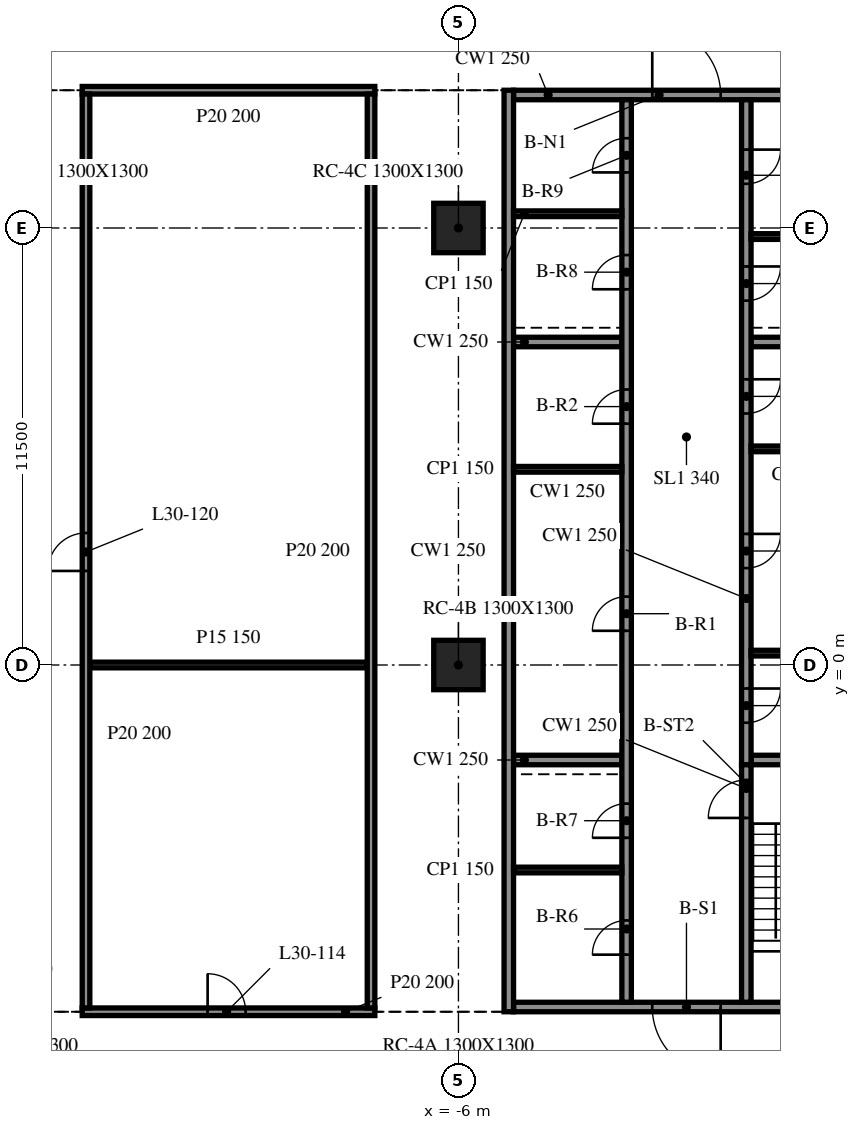
"""IFC4 building model, lengths in metres.
Left out: names, types, materials, properties, quantities, classifications, styles, units other than length and angle.
Written with IfcOpenShell. Run it as: python <this file> out.ifc"""

import sys

from ifc_helpers import new_model, si_unit, direction, frame, frame_2d, origin, origin_2d, place, context, subcontext, project, spatial, rectangle, extrude, element, fill, save


model = new_model("IFC4")
c1 = context("Model", 3, precision=1e-05, world=origin(), true_north=direction((0.0, 1.0)))
c2 = subcontext(c1, "Body", "Model", "MODEL_VIEW")
j1 = project(units=[si_unit("LENGTHUNIT", "METRE"), si_unit("PLANEANGLEUNIT", "RADIAN")], contexts=[c1])
p1 = place(None, origin())
s1 = spatial("IfcSite", under=j1, at=p1, CompositionType="ELEMENT")
p2 = place(p1, origin())
s2 = spatial("IfcBuilding", under=s1, at=p2, CompositionType="ELEMENT")
p3 = place(p2, frame((0.0, 0.0, 130.2)))
s3 = spatial("IfcBuildingStorey", under=s2, at=p3, CompositionType="ELEMENT", Elevation=130.2)
for number, where, z_axis, x_axis in (
    (1, (-6.0, 0.0, -0.34), (0.0, 0.0, 1.0), (1.0, 0.0, 0.0)),
    (2, (-6.0, 11.5, -0.34), (0.0, 0.0, 1.0), (1.0, 0.0, 0.0)),
):
    element("IfcColumn", number, at=place(p3, frame(where, z_axis=z_axis, x_axis=x_axis)), inside=s3, PredefinedType="COLUMN", context=c2, shape_type="SweptSolid", body=[
        extrude(rectangle(XDim=1.3, YDim=1.3, at=origin_2d()), origin(), (0.0, 0.0, 1.0), 4.1),
    ])
p4 = place(p3, frame((-4.675, 15.125, 0.0), z_axis=(0.0, 0.0, 1.0), x_axis=(0.0, -1.0, 0.0)))
e3 = element("IfcWall", 3, at=p4, inside=s3, PredefinedType="SOLIDWALL", context=c2, shape_type="SweptSolid", body=[
    extrude(rectangle(XDim=24.25, YDim=0.25, at=frame_2d((12.125, 0.0))), origin(), (0.0, 0.0, 1.0), 3.76),
])
p5 = place(p3, frame((4.55, -9.0, 0.0), z_axis=(0.0, 0.0, 1.0), x_axis=(-1.0, 0.0, 0.0)))
e4 = element("IfcWall", 4, at=p5, inside=s3, PredefinedType="SOLIDWALL", context=c2, shape_type="SweptSolid", body=[
    extrude(rectangle(XDim=9.1, YDim=0.25, at=frame_2d((4.55, 0.0))), origin(), (0.0, 0.0, 1.0), 3.76),
])
p6 = place(p5, frame((3.65, 0.0, 0.0)))
e5 = element("IfcOpeningElement", 5, at=p6, cuts=e4, PredefinedType="OPENING", context=c2, shape_type="SweptSolid", body=[
    extrude(rectangle(XDim=1.8, YDim=2.1, at=frame_2d((0.9, 1.05))), frame((0.0, 0.135, 0.0), z_axis=(0.0, -1.0, 0.0), x_axis=(1.0, 0.0, 0.0)), (0.0, 0.0, 1.0), 0.27),
])
p7 = place(p3, frame((-4.55, 15.0, 0.0), z_axis=(0.0, 0.0, 1.0), x_axis=(1.0, 0.0, 0.0)))
e6 = element("IfcWall", 6, at=p7, inside=s3, PredefinedType="SOLIDWALL", context=c2, shape_type="SweptSolid", body=[
    extrude(rectangle(XDim=9.1, YDim=0.25, at=frame_2d((4.55, 0.0))), origin(), (0.0, 0.0, 1.0), 3.76),
])
p8 = place(p7, frame((3.65, 0.0, 0.0)))
e7 = element("IfcOpeningElement", 7, at=p8, cuts=e6, PredefinedType="OPENING", context=c2, shape_type="SweptSolid", body=[
    extrude(rectangle(XDim=1.8, YDim=2.1, at=frame_2d((0.9, 1.05))), frame((0.0, 0.135, 0.0), z_axis=(0.0, -1.0, 0.0), x_axis=(1.0, 0.0, 0.0)), (0.0, 0.0, 1.0), 0.27),
])
p9 = place(p3, frame((-1.575, -8.875, 0.0), z_axis=(0.0, 0.0, 1.0), x_axis=(0.0, 1.0, 0.0)))
e8 = element("IfcWall", 8, at=p9, inside=s3, PredefinedType="SOLIDWALL", context=c2, shape_type="SweptSolid", body=[
    extrude(rectangle(XDim=23.75, YDim=0.25, at=frame_2d((11.875, 0.0))), origin(), (0.0, 0.0, 1.0), 3.76),
])
p10 = place(p9, frame((9.775, 0.0, 0.0)))
e9 = element("IfcOpeningElement", 9, at=p10, cuts=e8, PredefinedType="OPENING", context=c2, shape_type="SweptSolid", body=[
    extrude(rectangle(XDim=0.9, YDim=2.1, at=frame_2d((0.45, 1.05))), frame((0.0, 0.135, 0.0), z_axis=(0.0, -1.0, 0.0), x_axis=(1.0, 0.0, 0.0)), (0.0, 0.0, 1.0), 0.27),
])
p11 = place(p9, frame((15.225, 0.0, 0.0)))
e10 = element("IfcOpeningElement", 10, at=p11, cuts=e8, PredefinedType="OPENING", context=c2, shape_type="SweptSolid", body=[
    extrude(rectangle(XDim=0.9, YDim=2.1, at=frame_2d((0.45, 1.05))), frame((0.0, 0.135, 0.0), z_axis=(0.0, -1.0, 0.0), x_axis=(1.0, 0.0, 0.0)), (0.0, 0.0, 1.0), 0.27),
])
p12 = place(p9, frame((1.252, 0.0, 0.0)))
e11 = element("IfcOpeningElement", 11, at=p12, cuts=e8, PredefinedType="OPENING", context=c2, shape_type="SweptSolid", body=[
    extrude(rectangle(XDim=0.9, YDim=2.1, at=frame_2d((0.45, 1.05))), frame((0.0, 0.135, 0.0), z_axis=(0.0, -1.0, 0.0), x_axis=(1.0, 0.0, 0.0)), (0.0, 0.0, 1.0), 0.27),
])
p13 = place(p9, frame((4.327, 0.0, 0.0)))
e12 = element("IfcOpeningElement", 12, at=p13, cuts=e8, PredefinedType="OPENING", context=c2, shape_type="SweptSolid", body=[
    extrude(rectangle(XDim=0.9, YDim=2.1, at=frame_2d((0.45, 1.05))), frame((0.0, 0.135, 0.0), z_axis=(0.0, -1.0, 0.0), x_axis=(1.0, 0.0, 0.0)), (0.0, 0.0, 1.0), 0.27),
])
p14 = place(p9, frame((18.762, 0.0, 0.0)))
e13 = element("IfcOpeningElement", 13, at=p14, cuts=e8, PredefinedType="OPENING", context=c2, shape_type="SweptSolid", body=[
    extrude(rectangle(XDim=0.9, YDim=2.1, at=frame_2d((0.45, 1.05))), frame((0.0, 0.135, 0.0), z_axis=(0.0, -1.0, 0.0), x_axis=(1.0, 0.0, 0.0)), (0.0, 0.0, 1.0), 0.27),
])
p15 = place(p9, frame((21.837, 0.0, 0.0)))
e14 = element("IfcOpeningElement", 14, at=p15, cuts=e8, PredefinedType="OPENING", context=c2, shape_type="SweptSolid", body=[
    extrude(rectangle(XDim=0.9, YDim=2.1, at=frame_2d((0.45, 1.05))), frame((0.0, 0.135, 0.0), z_axis=(0.0, -1.0, 0.0), x_axis=(1.0, 0.0, 0.0)), (0.0, 0.0, 1.0), 0.27),
])
p16 = place(p3, frame((1.575, -8.875, 0.0), z_axis=(0.0, 0.0, 1.0), x_axis=(0.0, 1.0, 0.0)))
e15 = element("IfcWall", 15, at=p16, inside=s3, PredefinedType="SOLIDWALL", context=c2, shape_type="SweptSolid", body=[
    extrude(rectangle(XDim=6.25, YDim=0.25, at=frame_2d((3.125, 0.0))), origin(), (0.0, 0.0, 1.0), 3.76),
])
p17 = place(p16, frame((4.85, 0.0, 0.0)))
e16 = element("IfcOpeningElement", 16, at=p17, cuts=e15, PredefinedType="OPENING", context=c2, shape_type="SweptSolid", body=[
    extrude(rectangle(XDim=1.0, YDim=2.1, at=frame_2d((0.5, 1.05))), frame((0.0, 0.135, 0.0), z_axis=(0.0, -1.0, 0.0), x_axis=(1.0, 0.0, 0.0)), (0.0, 0.0, 1.0), 0.27),
])
p18 = place(p3, frame((1.575, 14.875, 0.0), z_axis=(0.0, 0.0, 1.0), x_axis=(0.0, -1.0, 0.0)))
e17 = element("IfcWall", 17, at=p18, inside=s3, PredefinedType="SOLIDWALL", context=c2, shape_type="SweptSolid", body=[
    extrude(rectangle(XDim=17.5, YDim=0.25, at=frame_2d((8.75, 0.0))), origin(), (0.0, 0.0, 1.0), 3.76),
])
p19 = place(p18, frame((15.494, 0.0, 0.0)))
e18 = element("IfcOpeningElement", 18, at=p19, cuts=e17, PredefinedType="OPENING", context=c2, shape_type="SweptSolid", body=[
    extrude(rectangle(XDim=0.9, YDim=2.1, at=frame_2d((0.45, 1.05))), frame((0.0, 0.135, 0.0), z_axis=(0.0, -1.0, 0.0), x_axis=(1.0, 0.0, 0.0)), (0.0, 0.0, 1.0), 0.27),
])
p20 = place(p18, frame((11.425, 0.0, 0.0)))
e19 = element("IfcOpeningElement", 19, at=p20, cuts=e17, PredefinedType="OPENING", context=c2, shape_type="SweptSolid", body=[
    extrude(rectangle(XDim=0.9, YDim=2.1, at=frame_2d((0.45, 1.05))), frame((0.0, 0.135, 0.0), z_axis=(0.0, -1.0, 0.0), x_axis=(1.0, 0.0, 0.0)), (0.0, 0.0, 1.0), 0.27),
])
p21 = place(p18, frame((7.356, 0.0, 0.0)))
e20 = element("IfcOpeningElement", 20, at=p21, cuts=e17, PredefinedType="OPENING", context=c2, shape_type="SweptSolid", body=[
    extrude(rectangle(XDim=0.9, YDim=2.1, at=frame_2d((0.45, 1.05))), frame((0.0, 0.135, 0.0), z_axis=(0.0, -1.0, 0.0), x_axis=(1.0, 0.0, 0.0)), (0.0, 0.0, 1.0), 0.27),
])
p22 = place(p18, frame((4.387, 0.0, 0.0)))
e21 = element("IfcOpeningElement", 21, at=p22, cuts=e17, PredefinedType="OPENING", context=c2, shape_type="SweptSolid", body=[
    extrude(rectangle(XDim=0.9, YDim=2.1, at=frame_2d((0.45, 1.05))), frame((0.0, 0.135, 0.0), z_axis=(0.0, -1.0, 0.0), x_axis=(1.0, 0.0, 0.0)), (0.0, 0.0, 1.0), 0.27),
])
p23 = place(p18, frame((1.312, 0.0, 0.0)))
e22 = element("IfcOpeningElement", 22, at=p23, cuts=e17, PredefinedType="OPENING", context=c2, shape_type="SweptSolid", body=[
    extrude(rectangle(XDim=0.9, YDim=2.1, at=frame_2d((0.45, 1.05))), frame((0.0, 0.135, 0.0), z_axis=(0.0, -1.0, 0.0), x_axis=(1.0, 0.0, 0.0)), (0.0, 0.0, 1.0), 0.27),
])
for number, where, z_axis, x_axis in (
    (23, (-4.55, -2.5, 0.0), (0.0, 0.0, 1.0), (1.0, 0.0, 0.0)),
    (24, (-4.55, 8.5, 0.0), (0.0, 0.0, 1.0), (1.0, 0.0, 0.0)),
    (25, (1.7, -2.5, 0.0), (0.0, 0.0, 1.0), (1.0, 0.0, 0.0)),
    (26, (1.7, 8.5, 0.0), (0.0, 0.0, 1.0), (1.0, 0.0, 0.0)),
):
    element("IfcWall", number, at=place(p3, frame(where, z_axis=z_axis, x_axis=x_axis)), inside=s3, PredefinedType="SOLIDWALL", context=c2, shape_type="SweptSolid", body=[
        extrude(rectangle(XDim=2.85, YDim=0.25, at=frame_2d((1.425, 0.0))), origin(), (0.0, 0.0, 1.0), 3.76),
    ])
for number, where, z_axis, x_axis in (
    (27, (-4.55, 5.15, 0.0), (0.0, 0.0, 1.0), (1.0, 0.0, 0.0)),
    (28, (1.7, 0.312, 0.0), (0.0, 0.0, 1.0), (1.0, 0.0, 0.0)),
    (29, (1.7, 5.688, 0.0), (0.0, 0.0, 1.0), (1.0, 0.0, 0.0)),
    (30, (-4.55, -5.395, 0.0), (0.0, 0.0, 1.0), (1.0, 0.0, 0.0)),
    (31, (-4.55, 11.875, 0.0), (0.0, 0.0, 1.0), (1.0, 0.0, 0.0)),
    (32, (1.7, 11.275, 0.0), (0.0, 0.0, 1.0), (1.0, 0.0, 0.0)),
):
    element("IfcWall", number, at=place(p3, frame(where, z_axis=z_axis, x_axis=x_axis)), inside=s3, PredefinedType="PARTITIONING", context=c2, shape_type="SweptSolid", body=[
        extrude(rectangle(XDim=2.85, YDim=0.15, at=frame_2d((1.425, 0.0))), origin(), (0.0, 0.0, 1.0), 3.76),
    ])
p24 = place(p3, frame((-15.9, -9.125, 0.0), z_axis=(0.0, 0.0, 1.0), x_axis=(1.0, 0.0, 0.0)))
e33 = element("IfcWall", 33, at=p24, inside=s3, PredefinedType="PARTITIONING", context=c2, shape_type="SweptSolid", body=[
    extrude(rectangle(XDim=7.7, YDim=0.2, at=frame_2d((3.85, 0.0))), origin(), (0.0, 0.0, 1.0), 3.76),
])
p25 = place(p24, frame((3.3, 0.0, 0.0)))
e34 = element("IfcOpeningElement", 34, at=p25, cuts=e33, PredefinedType="OPENING", context=c2, shape_type="SweptSolid", body=[
    extrude(rectangle(XDim=1.0, YDim=2.1, at=frame_2d((0.5, 1.05))), frame((0.0, 0.11, 0.0), z_axis=(0.0, -1.0, 0.0), x_axis=(1.0, 0.0, 0.0)), (0.0, 0.0, 1.0), 0.22),
])
p26 = place(p3, frame((-15.7, 0.0, 0.0), z_axis=(0.0, 0.0, 1.0), x_axis=(1.0, 0.0, 0.0)))
e35 = element("IfcWall", 35, at=p26, inside=s3, PredefinedType="PARTITIONING", context=c2, shape_type="SweptSolid", body=[
    extrude(rectangle(XDim=7.3, YDim=0.15, at=frame_2d((3.65, 0.0))), origin(), (0.0, 0.0, 1.0), 3.76),
])
p27 = place(p3, frame((-15.9, 15.125, 0.0), z_axis=(0.0, 0.0, 1.0), x_axis=(1.0, 0.0, 0.0)))
e36 = element("IfcWall", 36, at=p27, inside=s3, PredefinedType="PARTITIONING", context=c2, shape_type="SweptSolid", body=[
    extrude(rectangle(XDim=7.7, YDim=0.2, at=frame_2d((3.85, 0.0))), origin(), (0.0, 0.0, 1.0), 3.76),
])
p28 = place(p3, frame((-15.8, -9.025, 0.0), z_axis=(0.0, 0.0, 1.0), x_axis=(0.0, 1.0, 0.0)))
e37 = element("IfcWall", 37, at=p28, inside=s3, PredefinedType="PARTITIONING", context=c2, shape_type="SweptSolid", body=[
    extrude(rectangle(XDim=24.05, YDim=0.2, at=frame_2d((12.025, 0.0))), origin(), (0.0, 0.0, 1.0), 3.76),
])
p29 = place(p28, frame((11.5, 0.0, 0.0)))
e38 = element("IfcOpeningElement", 38, at=p29, cuts=e37, PredefinedType="OPENING", context=c2, shape_type="SweptSolid", body=[
    extrude(rectangle(XDim=1.0, YDim=2.1, at=frame_2d((0.5, 1.05))), frame((0.0, 0.11, 0.0), z_axis=(0.0, -1.0, 0.0), x_axis=(1.0, 0.0, 0.0)), (0.0, 0.0, 1.0), 0.22),
])
p30 = place(p3, frame((-8.3, -9.025, 0.0), z_axis=(0.0, 0.0, 1.0), x_axis=(0.0, 1.0, 0.0)))
e39 = element("IfcWall", 39, at=p30, inside=s3, PredefinedType="PARTITIONING", context=c2, shape_type="SweptSolid", body=[
    extrude(rectangle(XDim=24.05, YDim=0.2, at=frame_2d((12.025, 0.0))), origin(), (0.0, 0.0, 1.0), 3.76),
])
p31 = place(p6, origin())
e40 = element("IfcDoor", 40, at=p31, inside=s3, OperationType="DOUBLE_DOOR_SINGLE_SWING", PredefinedType="DOOR", context=c2, shape_type="SweptSolid", body=[
    extrude(rectangle(XDim=1.8, YDim=2.1, at=frame_2d((0.9, 1.05))), frame((0.0, 0.025, 0.0), z_axis=(0.0, -1.0, 0.0), x_axis=(1.0, 0.0, 0.0)), (0.0, 0.0, 1.0), 0.05),
])
fill(e5, e40)
p32 = place(p8, origin())
e41 = element("IfcDoor", 41, at=p32, inside=s3, OperationType="DOUBLE_DOOR_SINGLE_SWING", PredefinedType="DOOR", context=c2, shape_type="SweptSolid", body=[
    extrude(rectangle(XDim=1.8, YDim=2.1, at=frame_2d((0.9, 1.05))), frame((0.0, 0.025, 0.0), z_axis=(0.0, -1.0, 0.0), x_axis=(1.0, 0.0, 0.0)), (0.0, 0.0, 1.0), 0.05),
])
fill(e7, e41)
p33 = place(p10, origin())
e42 = element("IfcDoor", 42, at=p33, inside=s3, OperationType="SINGLE_SWING_LEFT", PredefinedType="DOOR", context=c2, shape_type="SweptSolid", body=[
    extrude(rectangle(XDim=0.9, YDim=2.1, at=frame_2d((0.45, 1.05))), frame((0.0, 0.025, 0.0), z_axis=(0.0, -1.0, 0.0), x_axis=(1.0, 0.0, 0.0)), (0.0, 0.0, 1.0), 0.05),
])
fill(e9, e42)
p34 = place(p11, origin())
e43 = element("IfcDoor", 43, at=p34, inside=s3, OperationType="SINGLE_SWING_RIGHT", PredefinedType="DOOR", context=c2, shape_type="SweptSolid", body=[
    extrude(rectangle(XDim=0.9, YDim=2.1, at=frame_2d((0.45, 1.05))), frame((0.0, 0.025, 0.0), z_axis=(0.0, -1.0, 0.0), x_axis=(1.0, 0.0, 0.0)), (0.0, 0.0, 1.0), 0.05),
])
fill(e10, e43)
p35 = place(p19, origin())
e44 = element("IfcDoor", 44, at=p35, inside=s3, OperationType="SINGLE_SWING_LEFT", PredefinedType="DOOR", context=c2, shape_type="SweptSolid", body=[
    extrude(rectangle(XDim=0.9, YDim=2.1, at=frame_2d((0.45, 1.05))), frame((0.0, 0.025, 0.0), z_axis=(0.0, -1.0, 0.0), x_axis=(1.0, 0.0, 0.0)), (0.0, 0.0, 1.0), 0.05),
])
fill(e18, e44)
p36 = place(p20, origin())
e45 = element("IfcDoor", 45, at=p36, inside=s3, OperationType="SINGLE_SWING_RIGHT", PredefinedType="DOOR", context=c2, shape_type="SweptSolid", body=[
    extrude(rectangle(XDim=0.9, YDim=2.1, at=frame_2d((0.45, 1.05))), frame((0.0, 0.025, 0.0), z_axis=(0.0, -1.0, 0.0), x_axis=(1.0, 0.0, 0.0)), (0.0, 0.0, 1.0), 0.05),
])
fill(e19, e45)
p37 = place(p21, origin())
e46 = element("IfcDoor", 46, at=p37, inside=s3, OperationType="SINGLE_SWING_LEFT", PredefinedType="DOOR", context=c2, shape_type="SweptSolid", body=[
    extrude(rectangle(XDim=0.9, YDim=2.1, at=frame_2d((0.45, 1.05))), frame((0.0, 0.025, 0.0), z_axis=(0.0, -1.0, 0.0), x_axis=(1.0, 0.0, 0.0)), (0.0, 0.0, 1.0), 0.05),
])
fill(e20, e46)
p38 = place(p12, origin())
e47 = element("IfcDoor", 47, at=p38, inside=s3, OperationType="SINGLE_SWING_RIGHT", PredefinedType="DOOR", context=c2, shape_type="SweptSolid", body=[
    extrude(rectangle(XDim=0.9, YDim=2.1, at=frame_2d((0.45, 1.05))), frame((0.0, 0.025, 0.0), z_axis=(0.0, -1.0, 0.0), x_axis=(1.0, 0.0, 0.0)), (0.0, 0.0, 1.0), 0.05),
])
fill(e11, e47)
p39 = place(p13, origin())
e48 = element("IfcDoor", 48, at=p39, inside=s3, OperationType="SINGLE_SWING_LEFT", PredefinedType="DOOR", context=c2, shape_type="SweptSolid", body=[
    extrude(rectangle(XDim=0.9, YDim=2.1, at=frame_2d((0.45, 1.05))), frame((0.0, 0.025, 0.0), z_axis=(0.0, -1.0, 0.0), x_axis=(1.0, 0.0, 0.0)), (0.0, 0.0, 1.0), 0.05),
])
fill(e12, e48)
p40 = place(p14, origin())
e49 = element("IfcDoor", 49, at=p40, inside=s3, OperationType="SINGLE_SWING_RIGHT", PredefinedType="DOOR", context=c2, shape_type="SweptSolid", body=[
    extrude(rectangle(XDim=0.9, YDim=2.1, at=frame_2d((0.45, 1.05))), frame((0.0, 0.025, 0.0), z_axis=(0.0, -1.0, 0.0), x_axis=(1.0, 0.0, 0.0)), (0.0, 0.0, 1.0), 0.05),
])
fill(e13, e49)
p41 = place(p15, origin())
e50 = element("IfcDoor", 50, at=p41, inside=s3, OperationType="SINGLE_SWING_LEFT", PredefinedType="DOOR", context=c2, shape_type="SweptSolid", body=[
    extrude(rectangle(XDim=0.9, YDim=2.1, at=frame_2d((0.45, 1.05))), frame((0.0, 0.025, 0.0), z_axis=(0.0, -1.0, 0.0), x_axis=(1.0, 0.0, 0.0)), (0.0, 0.0, 1.0), 0.05),
])
fill(e14, e50)
p42 = place(p22, origin())
e51 = element("IfcDoor", 51, at=p42, inside=s3, OperationType="SINGLE_SWING_RIGHT", PredefinedType="DOOR", context=c2, shape_type="SweptSolid", body=[
    extrude(rectangle(XDim=0.9, YDim=2.1, at=frame_2d((0.45, 1.05))), frame((0.0, 0.025, 0.0), z_axis=(0.0, -1.0, 0.0), x_axis=(1.0, 0.0, 0.0)), (0.0, 0.0, 1.0), 0.05),
])
fill(e21, e51)
p43 = place(p23, origin())
e52 = element("IfcDoor", 52, at=p43, inside=s3, OperationType="SINGLE_SWING_LEFT", PredefinedType="DOOR", context=c2, shape_type="SweptSolid", body=[
    extrude(rectangle(XDim=0.9, YDim=2.1, at=frame_2d((0.45, 1.05))), frame((0.0, 0.025, 0.0), z_axis=(0.0, -1.0, 0.0), x_axis=(1.0, 0.0, 0.0)), (0.0, 0.0, 1.0), 0.05),
])
fill(e22, e52)
p44 = place(p17, origin())
e53 = element("IfcDoor", 53, at=p44, inside=s3, OperationType="SINGLE_SWING_RIGHT", PredefinedType="DOOR", context=c2, shape_type="SweptSolid", body=[
    extrude(rectangle(XDim=1.0, YDim=2.1, at=frame_2d((0.5, 1.05))), frame((0.0, 0.025, 0.0), z_axis=(0.0, -1.0, 0.0), x_axis=(1.0, 0.0, 0.0)), (0.0, 0.0, 1.0), 0.05),
])
fill(e16, e53)
p45 = place(p25, origin())
e54 = element("IfcDoor", 54, at=p45, inside=s3, OperationType="SINGLE_SWING_LEFT", PredefinedType="DOOR", context=c2, shape_type="SweptSolid", body=[
    extrude(rectangle(XDim=1.0, YDim=2.1, at=frame_2d((0.5, 1.05))), frame((0.0, 0.025, 0.0), z_axis=(0.0, -1.0, 0.0), x_axis=(1.0, 0.0, 0.0)), (0.0, 0.0, 1.0), 0.05),
])
fill(e34, e54)
p46 = place(p29, origin())
e55 = element("IfcDoor", 55, at=p46, inside=s3, OperationType="SINGLE_SWING_RIGHT", PredefinedType="DOOR", context=c2, shape_type="SweptSolid", body=[
    extrude(rectangle(XDim=1.0, YDim=2.1, at=frame_2d((0.5, 1.05))), frame((0.0, 0.025, 0.0), z_axis=(0.0, -1.0, 0.0), x_axis=(1.0, 0.0, 0.0)), (0.0, 0.0, 1.0), 0.05),
])
fill(e38, e55)
save(model, sys.argv[1])
